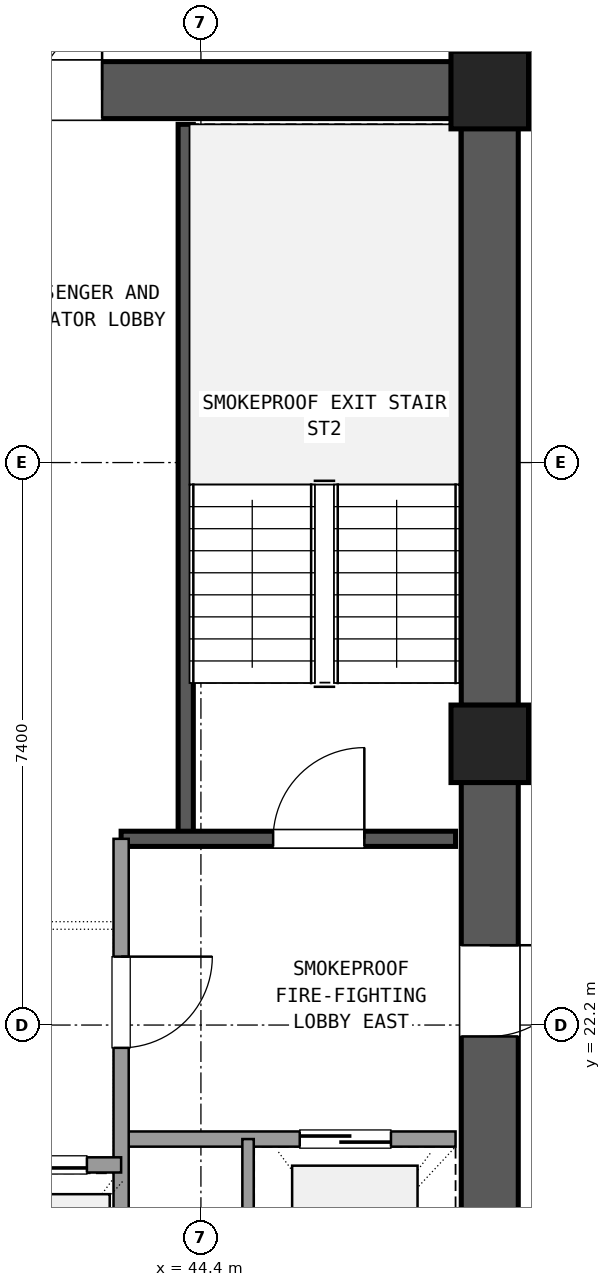
"""IFC4 building model, lengths in metres.
Left out: names, types, materials, properties, quantities, classifications, styles, units other than length and angle.
Written with IfcOpenShell. Run it as: python <this file> out.ifc"""

import sys

from ifc_helpers import new_model, si_unit, direction, frame, frame_2d, origin, origin_2d, place, context, subcontext, project, spatial, rectangle, extrude, element, fill, save


model = new_model("IFC4")
c1 = context("Model", 3, precision=1e-05, world=origin(), true_north=direction((0.0, 1.0)))
c2 = subcontext(c1, "Body", "Model", "MODEL_VIEW")
j1 = project(units=[si_unit("LENGTHUNIT", "METRE"), si_unit("PLANEANGLEUNIT", "RADIAN")], contexts=[c1])
p1 = place(None, origin())
s1 = spatial("IfcSite", under=j1, at=p1, CompositionType="ELEMENT")
p2 = place(p1, origin())
s2 = spatial("IfcBuilding", under=s1, at=p2, CompositionType="ELEMENT")
p3 = place(p2, frame((0.0, 0.0, 88.38)))
s3 = spatial("IfcBuildingStorey", under=s2, at=p3, CompositionType="ELEMENT", Elevation=88.38)
for number, where, z_axis, x_axis in (
    (1, (48.2, 25.9, 0.0), (0.0, 0.0, 1.0), (1.0, 0.0, 0.0)),
    (2, (48.2, 34.5, 0.0), (0.0, 0.0, 1.0), (1.0, 0.0, 0.0)),
):
    element("IfcColumn", number, at=place(p3, frame(where, z_axis=z_axis, x_axis=x_axis)), inside=s3, PredefinedType="COLUMN", context=c2, shape_type="SweptSolid", body=[
        extrude(rectangle(XDim=1.02, YDim=1.02, at=origin_2d()), origin(), (0.0, 0.0, 1.0), 3.6),
    ])
p4 = place(p3, frame((48.2, 17.805, 0.0), z_axis=(0.0, 0.0, 1.0), x_axis=(0.0, 1.0, 0.0)))
e3 = element("IfcWall", 3, at=p4, inside=s3, PredefinedType="SHEAR", context=c2, shape_type="SweptSolid", body=[
    extrude(rectangle(XDim=7.59, YDim=0.75, at=frame_2d((3.795, 0.0))), origin(), (0.0, 0.0, 1.0), 3.32),
])
p5 = place(p4, frame((4.245, 0.0, 0.0)))
e4 = element("IfcOpeningElement", 4, at=p5, cuts=e3, PredefinedType="OPENING", context=c2, shape_type="SweptSolid", body=[
    extrude(rectangle(XDim=1.2, YDim=2.15, at=frame_2d((0.6, 1.075))), frame((0.0, 0.385, 0.0), z_axis=(0.0, -1.0, 0.0), x_axis=(1.0, 0.0, 0.0)), (0.0, 0.0, 1.0), 0.77),
])
p6 = place(p3, frame((48.2, 26.405, 0.0), z_axis=(0.0, 0.0, 1.0), x_axis=(0.0, 1.0, 0.0)))
e5 = element("IfcWall", 5, at=p6, inside=s3, PredefinedType="SHEAR", context=c2, shape_type="SweptSolid", body=[
    extrude(rectangle(XDim=7.59, YDim=0.75, at=frame_2d((3.795, 0.0))), origin(), (0.0, 0.0, 1.0), 3.32),
])
p7 = place(p3, frame((47.695, 34.5, 0.0), z_axis=(0.0, 0.0, 1.0), x_axis=(-1.0, 0.0, 0.0)))
e6 = element("IfcWall", 6, at=p7, inside=s3, PredefinedType="SHEAR", context=c2, shape_type="SweptSolid", body=[
    extrude(rectangle(XDim=10.19, YDim=0.75, at=frame_2d((5.095, 0.0))), origin(), (0.0, 0.0, 1.0), 3.32),
])
p8 = place(p7, frame((4.595, 0.0, 0.0)))
e7 = element("IfcOpeningElement", 7, at=p8, cuts=e6, PredefinedType="OPENING", context=c2, shape_type="SweptSolid", body=[
    extrude(rectangle(XDim=1.6, YDim=2.2, at=frame_2d((0.8, 1.1))), frame((0.0, 0.385, 0.0), z_axis=(0.0, -1.0, 0.0), x_axis=(1.0, 0.0, 0.0)), (0.0, 0.0, 1.0), 0.77),
])
p9 = place(p3, frame((44.2, 24.65, 0.0), z_axis=(0.0, 0.0, 1.0), x_axis=(0.0, 1.0, 0.0)))
e8 = element("IfcWall", 8, at=p9, inside=s3, PredefinedType="SHEAR", context=c2, shape_type="SweptSolid", body=[
    extrude(rectangle(XDim=9.4, YDim=0.2, at=frame_2d((4.7, 0.0))), origin(), (0.0, 0.0, 1.0), 3.32),
])
p10 = place(p3, frame((43.35, 24.65, 0.0), z_axis=(0.0, 0.0, 1.0), x_axis=(1.0, 0.0, 0.0)))
e9 = element("IfcWall", 9, at=p10, inside=s3, PredefinedType="SHEAR", context=c2, shape_type="SweptSolid", body=[
    extrude(rectangle(XDim=4.4, YDim=0.2, at=frame_2d((2.2, 0.0))), origin(), (0.0, 0.0, 1.0), 3.32),
])
p11 = place(p10, frame((2.0, 0.0, 0.0)))
e10 = element("IfcOpeningElement", 10, at=p11, cuts=e9, PredefinedType="OPENING", context=c2, shape_type="SweptSolid", body=[
    extrude(rectangle(XDim=1.2, YDim=2.15, at=frame_2d((0.6, 1.075))), frame((0.0, 0.11, 0.0), z_axis=(0.0, -1.0, 0.0), x_axis=(1.0, 0.0, 0.0)), (0.0, 0.0, 1.0), 0.22),
])
p12 = place(p3, frame((43.35, 20.7, 0.0), z_axis=(0.0, 0.0, 1.0), x_axis=(1.0, 0.0, 0.0)))
e11 = element("IfcWall", 11, at=p12, inside=s3, PredefinedType="SOLIDWALL", context=c2, shape_type="SweptSolid", body=[
    extrude(rectangle(XDim=4.4, YDim=0.2, at=frame_2d((2.2, 0.0))), origin(), (0.0, 0.0, 1.0), 2.61),
])
p13 = place(p12, frame((2.35, 0.0, 0.0)))
e12 = element("IfcOpeningElement", 12, at=p13, cuts=e11, PredefinedType="OPENING", context=c2, shape_type="SweptSolid", body=[
    extrude(rectangle(XDim=1.2, YDim=2.15, at=frame_2d((0.6, 1.075))), frame((0.0, 0.11, 0.0), z_axis=(0.0, -1.0, 0.0), x_axis=(1.0, 0.0, 0.0)), (0.0, 0.0, 1.0), 0.22),
])
p14 = place(p3, frame((43.35, 17.75, 0.0), z_axis=(0.0, 0.0, 1.0), x_axis=(0.0, 1.0, 0.0)))
e13 = element("IfcWall", 13, at=p14, inside=s3, PredefinedType="SOLIDWALL", context=c2, shape_type="SweptSolid", body=[
    extrude(rectangle(XDim=6.9, YDim=0.2, at=frame_2d((3.45, 0.0))), origin(), (0.0, 0.0, 1.0), 2.61),
])
p15 = place(p14, frame((4.15, 0.0, 0.0)))
e14 = element("IfcOpeningElement", 14, at=p15, cuts=e13, PredefinedType="OPENING", context=c2, shape_type="SweptSolid", body=[
    extrude(rectangle(XDim=1.2, YDim=2.15, at=frame_2d((0.6, 1.075))), frame((0.0, 0.11, 0.0), z_axis=(0.0, -1.0, 0.0), x_axis=(1.0, 0.0, 0.0)), (0.0, 0.0, 1.0), 0.22),
])
p16 = place(p3, frame((45.02, 17.75, 0.0), z_axis=(0.0, 0.0, 1.0), x_axis=(0.0, 1.0, 0.0)))
e15 = element("IfcWall", 15, at=p16, inside=s3, PredefinedType="PARTITIONING", context=c2, shape_type="SweptSolid", body=[
    extrude(rectangle(XDim=2.95, YDim=0.15, at=frame_2d((1.475, 0.0))), origin(), (0.0, 0.0, 1.0), 2.61),
])
p17 = place(p3, frame((37.25, 20.36, 0.0), z_axis=(0.0, 0.0, 1.0), x_axis=(1.0, 0.0, 0.0)))
e16 = element("IfcWall", 16, at=p17, inside=s3, PredefinedType="SOLIDWALL", context=c2, shape_type="SweptSolid", body=[
    extrude(rectangle(XDim=6.1, YDim=0.2, at=frame_2d((3.05, 0.0))), origin(), (0.0, 0.0, 1.0), 2.61),
])
p18 = place(p17, frame((0.45, 0.0, 0.0)))
e17 = element("IfcOpeningElement", 17, at=p18, cuts=e16, PredefinedType="OPENING", context=c2, shape_type="SweptSolid", body=[
    extrude(rectangle(XDim=1.1, YDim=2.15, at=frame_2d((0.55, 1.075))), frame((0.0, 0.11, 0.0), z_axis=(0.0, -1.0, 0.0), x_axis=(1.0, 0.0, 0.0)), (0.0, 0.0, 1.0), 0.22),
])
p19 = place(p17, frame((2.5, 0.0, 0.0)))
e18 = element("IfcOpeningElement", 18, at=p19, cuts=e16, PredefinedType="OPENING", context=c2, shape_type="SweptSolid", body=[
    extrude(rectangle(XDim=1.1, YDim=2.15, at=frame_2d((0.55, 1.075))), frame((0.0, 0.11, 0.0), z_axis=(0.0, -1.0, 0.0), x_axis=(1.0, 0.0, 0.0)), (0.0, 0.0, 1.0), 0.22),
])
p20 = place(p17, frame((4.55, 0.0, 0.0)))
e19 = element("IfcOpeningElement", 19, at=p20, cuts=e16, PredefinedType="OPENING", context=c2, shape_type="SweptSolid", body=[
    extrude(rectangle(XDim=1.1, YDim=2.15, at=frame_2d((0.55, 1.075))), frame((0.0, 0.11, 0.0), z_axis=(0.0, -1.0, 0.0), x_axis=(1.0, 0.0, 0.0)), (0.0, 0.0, 1.0), 0.22),
])
p21 = place(p11, origin())
e20 = element("IfcDoor", 20, at=p21, inside=s3, OperationType="SINGLE_SWING_RIGHT", PredefinedType="DOOR", context=c2, shape_type="SweptSolid", body=[
    extrude(rectangle(XDim=1.2, YDim=2.15, at=frame_2d((0.6, 1.075))), frame((0.0, 0.025, 0.0), z_axis=(0.0, -1.0, 0.0), x_axis=(1.0, 0.0, 0.0)), (0.0, 0.0, 1.0), 0.05),
])
fill(e10, e20)
p22 = place(p13, origin())
e21 = element("IfcDoor", 21, at=p22, inside=s3, OperationType="SLIDING_TO_RIGHT", PredefinedType="DOOR", context=c2, shape_type="SweptSolid", body=[
    extrude(rectangle(XDim=1.2, YDim=2.15, at=frame_2d((0.6, 1.075))), frame((0.0, 0.025, 0.0), z_axis=(0.0, -1.0, 0.0), x_axis=(1.0, 0.0, 0.0)), (0.0, 0.0, 1.0), 0.05),
])
fill(e12, e21)
p23 = place(p15, frame((1.2, 0.0, 0.0), z_axis=(0.0, 0.0, 1.0), x_axis=(-1.0, 0.0, 0.0)))
e22 = element("IfcDoor", 22, at=p23, inside=s3, OperationType="SINGLE_SWING_RIGHT", PredefinedType="DOOR", context=c2, shape_type="SweptSolid", body=[
    extrude(rectangle(XDim=1.2, YDim=2.15, at=frame_2d((0.6, 1.075))), frame((0.0, 0.025, 0.0), z_axis=(0.0, -1.0, 0.0), x_axis=(1.0, 0.0, 0.0)), (0.0, 0.0, 1.0), 0.05),
])
fill(e14, e22)
p24 = place(p5, frame((1.2, 0.0, 0.0), z_axis=(0.0, 0.0, 1.0), x_axis=(-1.0, 0.0, 0.0)))
e23 = element("IfcDoor", 23, at=p24, inside=s3, OperationType="SINGLE_SWING_RIGHT", PredefinedType="DOOR", context=c2, shape_type="SweptSolid", body=[
    extrude(rectangle(XDim=1.2, YDim=2.15, at=frame_2d((0.6, 1.075))), frame((0.0, 0.025, 0.0), z_axis=(0.0, -1.0, 0.0), x_axis=(1.0, 0.0, 0.0)), (0.0, 0.0, 1.0), 0.05),
])
fill(e4, e23)
p25 = place(p8, frame((1.6, 0.0, 0.0), z_axis=(0.0, 0.0, 1.0), x_axis=(-1.0, 0.0, 0.0)))
e24 = element("IfcDoor", 24, at=p25, inside=s3, OperationType="DOUBLE_DOOR_SINGLE_SWING", PredefinedType="DOOR", context=c2, shape_type="SweptSolid", body=[
    extrude(rectangle(XDim=1.6, YDim=2.2, at=frame_2d((0.8, 1.1))), frame((0.0, 0.025, 0.0), z_axis=(0.0, -1.0, 0.0), x_axis=(1.0, 0.0, 0.0)), (0.0, 0.0, 1.0), 0.05),
])
fill(e7, e24)
p26 = place(p20, origin())
e25 = element("IfcDoor", 25, at=p26, inside=s3, OperationType="SLIDING_TO_LEFT", PredefinedType="DOOR", context=c2, shape_type="SweptSolid", body=[
    extrude(rectangle(XDim=1.1, YDim=2.15, at=frame_2d((0.55, 1.075))), frame((0.0, 0.025, 0.0), z_axis=(0.0, -1.0, 0.0), x_axis=(1.0, 0.0, 0.0)), (0.0, 0.0, 1.0), 0.05),
])
fill(e19, e25)
save(model, sys.argv[1])
